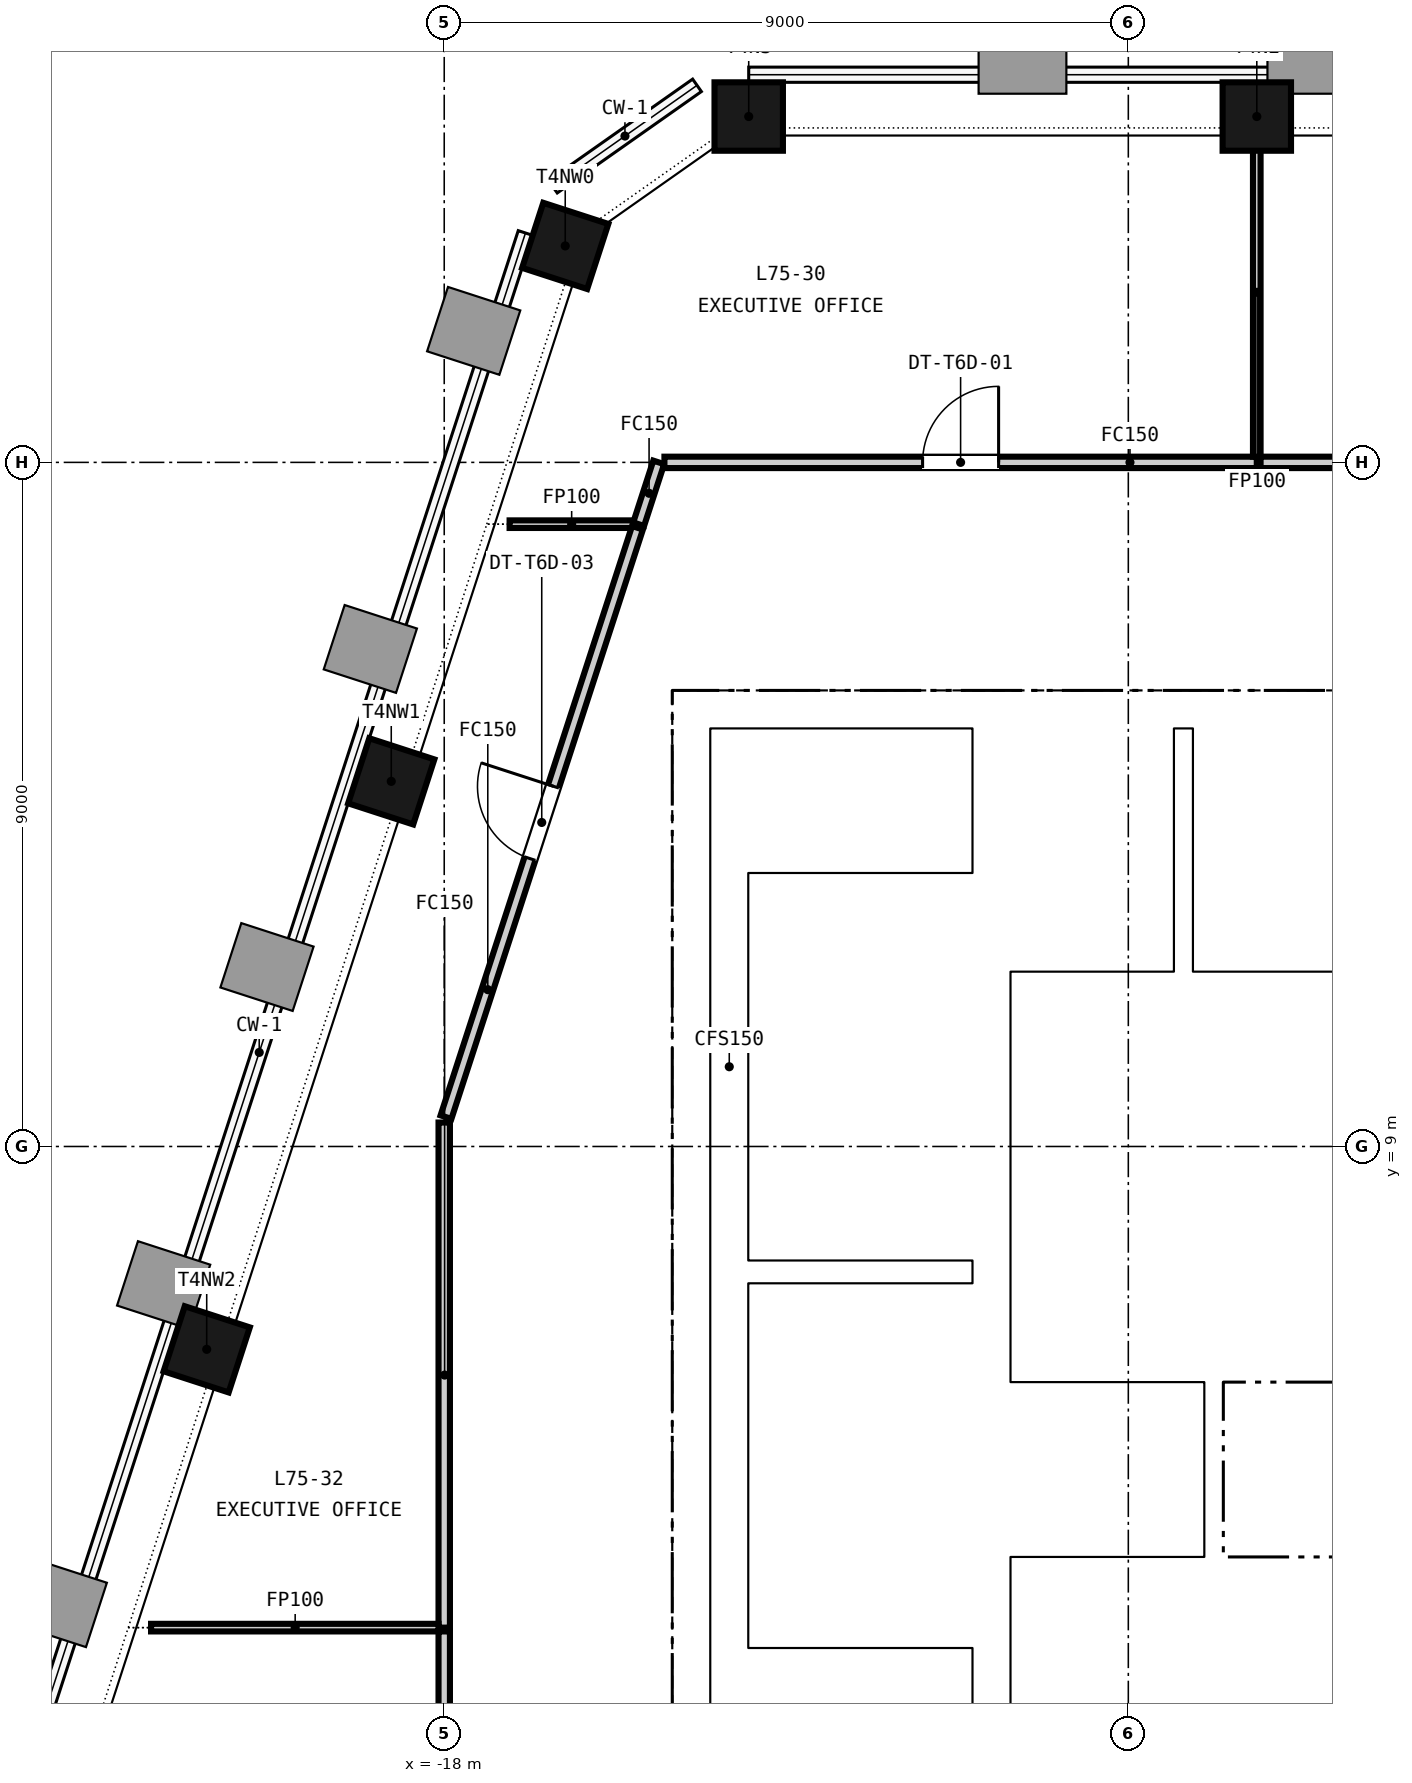
"""IFC4 building model, lengths in metres.
Left out: names, types, materials, properties, quantities, classifications, styles, units other than length and angle.
Written with IfcOpenShell. Run it as: python <this file> out.ifc"""

import sys

from ifc_helpers import new_model, si_unit, direction, frame, frame_2d, origin, origin_2d, place, context, subcontext, project, spatial, rectangle, extrude, element, fill, save


model = new_model("IFC4")
c1 = context("Model", 3, precision=1e-05, world=origin(), true_north=direction((0.0, 1.0)))
c2 = subcontext(c1, "Body", "Model", "MODEL_VIEW")
j1 = project(units=[si_unit("LENGTHUNIT", "METRE"), si_unit("PLANEANGLEUNIT", "RADIAN")], contexts=[c1])
p1 = place(None, origin())
s1 = spatial("IfcSite", under=j1, at=p1, CompositionType="ELEMENT")
p2 = place(p1, origin())
s2 = spatial("IfcBuilding", under=s1, at=p2, CompositionType="ELEMENT")
p3 = place(p2, frame((0.0, 0.0, 293.8)))
s3 = spatial("IfcBuildingStorey", under=s2, at=p3, CompositionType="ELEMENT", Elevation=293.8)
p4 = place(p3, frame((-15.0, 14.75, -0.15), z_axis=(0.0, 0.0, 1.0), x_axis=(1.0, 0.0, 0.0)))
e1 = element("IfcWall", 1, at=p4, inside=s3, PredefinedType="SOLIDWALL", context=c2, shape_type="SweptSolid", body=[
    extrude(rectangle(XDim=30.0, YDim=0.5, at=frame_2d((15.0, 0.0))), origin(), (0.0, 0.0, 1.0), 3.65),
])
p5 = place(p4, frame((9.25, 0.0, 0.15)))
e2 = element("IfcOpeningElement", 2, at=p5, cuts=e1, PredefinedType="OPENING", context=c2, shape_type="SweptSolid", body=[
    extrude(rectangle(XDim=1.5, YDim=2.1, at=frame_2d((0.75, 1.05))), frame((0.0, 0.26, 0.0), z_axis=(0.0, -1.0, 0.0), x_axis=(1.0, 0.0, 0.0)), (0.0, 0.0, 1.0), 0.52),
])
p6 = place(p4, frame((19.4, 0.0, 0.15)))
e3 = element("IfcOpeningElement", 3, at=p6, cuts=e1, PredefinedType="OPENING", context=c2, shape_type="SweptSolid", body=[
    extrude(rectangle(XDim=1.5, YDim=2.1, at=frame_2d((0.75, 1.05))), frame((0.0, 0.26, 0.0), z_axis=(0.0, -1.0, 0.0), x_axis=(1.0, 0.0, 0.0)), (0.0, 0.0, 1.0), 0.52),
])
p7 = place(p4, frame((1.5, 0.0, 0.15)))
e4 = element("IfcOpeningElement", 4, at=p7, cuts=e1, PredefinedType="OPENING", context=c2, shape_type="SweptSolid", body=[
    extrude(rectangle(XDim=1.2, YDim=2.1, at=frame_2d((0.6, 1.05))), frame((0.0, 0.26, 0.0), z_axis=(0.0, -1.0, 0.0), x_axis=(1.0, 0.0, 0.0)), (0.0, 0.0, 1.0), 0.52),
])
p8 = place(p4, frame((27.3, 0.0, 0.15)))
e5 = element("IfcOpeningElement", 5, at=p8, cuts=e1, PredefinedType="OPENING", context=c2, shape_type="SweptSolid", body=[
    extrude(rectangle(XDim=1.2, YDim=2.1, at=frame_2d((0.6, 1.05))), frame((0.0, 0.26, 0.0), z_axis=(0.0, -1.0, 0.0), x_axis=(1.0, 0.0, 0.0)), (0.0, 0.0, 1.0), 0.52),
])
for number, where, z_axis, x_axis in (
    (6, (-14.75, 0.5, -0.15), (0.0, 0.0, 1.0), (0.0, 1.0, 0.0)),
    (7, (-10.8, 0.5, -0.15), (0.0, 0.0, 1.0), (0.0, 1.0, 0.0)),
):
    element("IfcWall", number, at=place(p3, frame(where, z_axis=z_axis, x_axis=x_axis)), inside=s3, PredefinedType="SOLIDWALL", context=c2, shape_type="SweptSolid", body=[
        extrude(rectangle(XDim=14.0, YDim=0.5, at=frame_2d((7.0, 0.0))), origin(), (0.0, 0.0, 1.0), 3.65),
    ])
for number, where, z_axis, x_axis in (
    (8, (-7.31, 22.55, -0.15), (0.0, 0.0, 1.0), (-1.0, 0.0, 0.0)),
    (9, (-13.994, 22.55, -0.15), (0.0, 0.0, 1.0), (-1.0, 0.0, 0.0)),
    (10, (-16.408, 20.848, -0.15), (0.0, 0.0, 1.0), (-0.309, -0.951, 0.0)),
    (11, (-18.697, 13.804, -0.15), (0.0, 0.0, 1.0), (-0.309, -0.951, 0.0)),
    (12, (-21.125, 6.331, -0.15), (0.0, 0.0, 1.0), (-0.309, -0.951, 0.0)),
):
    element("IfcColumn", number, at=place(p3, frame(where, z_axis=z_axis, x_axis=x_axis)), inside=s3, PredefinedType="COLUMN", context=c2, shape_type="SweptSolid", body=[
        extrude(rectangle(XDim=0.9, YDim=0.9, at=origin_2d()), origin(), (0.0, 0.0, 1.0), 3.65),
    ])
p9 = place(p3, frame((-10.55, 3.5, 0.0), z_axis=(0.0, 0.0, 1.0), x_axis=(1.0, 0.0, 0.0)))
e13 = element("IfcWall", 13, at=p9, inside=s3, PredefinedType="PARTITIONING", context=c2, shape_type="SweptSolid", body=[
    extrude(rectangle(XDim=21.1, YDim=0.2, at=frame_2d((10.55, 0.0))), origin(), (0.0, 0.0, 1.0), 3.5),
])
p10 = place(p9, frame((0.675, 0.0, 0.0)))
e14 = element("IfcOpeningElement", 14, at=p10, cuts=e13, PredefinedType="OPENING", context=c2, shape_type="SweptSolid", body=[
    extrude(rectangle(XDim=1.2, YDim=2.1, at=frame_2d((0.6, 1.05))), frame((0.0, 0.11, 0.0), z_axis=(0.0, -1.0, 0.0), x_axis=(1.0, 0.0, 0.0)), (0.0, 0.0, 1.0), 0.22),
])
p11 = place(p9, frame((3.475, 0.0, 0.0)))
e15 = element("IfcOpeningElement", 15, at=p11, cuts=e13, PredefinedType="OPENING", context=c2, shape_type="SweptSolid", body=[
    extrude(rectangle(XDim=1.2, YDim=2.1, at=frame_2d((0.6, 1.05))), frame((0.0, 0.11, 0.0), z_axis=(0.0, -1.0, 0.0), x_axis=(1.0, 0.0, 0.0)), (0.0, 0.0, 1.0), 0.22),
])
p12 = place(p9, frame((6.275, 0.0, 0.0)))
e16 = element("IfcOpeningElement", 16, at=p12, cuts=e13, PredefinedType="OPENING", context=c2, shape_type="SweptSolid", body=[
    extrude(rectangle(XDim=1.2, YDim=2.1, at=frame_2d((0.6, 1.05))), frame((0.0, 0.11, 0.0), z_axis=(0.0, -1.0, 0.0), x_axis=(1.0, 0.0, 0.0)), (0.0, 0.0, 1.0), 0.22),
])
p13 = place(p9, frame((9.075, 0.0, 0.0)))
e17 = element("IfcOpeningElement", 17, at=p13, cuts=e13, PredefinedType="OPENING", context=c2, shape_type="SweptSolid", body=[
    extrude(rectangle(XDim=1.2, YDim=2.1, at=frame_2d((0.6, 1.05))), frame((0.0, 0.11, 0.0), z_axis=(0.0, -1.0, 0.0), x_axis=(1.0, 0.0, 0.0)), (0.0, 0.0, 1.0), 0.22),
])
p14 = place(p9, frame((11.875, 0.0, 0.0)))
e18 = element("IfcOpeningElement", 18, at=p14, cuts=e13, PredefinedType="OPENING", context=c2, shape_type="SweptSolid", body=[
    extrude(rectangle(XDim=1.2, YDim=2.1, at=frame_2d((0.6, 1.05))), frame((0.0, 0.11, 0.0), z_axis=(0.0, -1.0, 0.0), x_axis=(1.0, 0.0, 0.0)), (0.0, 0.0, 1.0), 0.22),
])
p15 = place(p9, frame((14.675, 0.0, 0.0)))
e19 = element("IfcOpeningElement", 19, at=p15, cuts=e13, PredefinedType="OPENING", context=c2, shape_type="SweptSolid", body=[
    extrude(rectangle(XDim=1.2, YDim=2.1, at=frame_2d((0.6, 1.05))), frame((0.0, 0.11, 0.0), z_axis=(0.0, -1.0, 0.0), x_axis=(1.0, 0.0, 0.0)), (0.0, 0.0, 1.0), 0.22),
])
p16 = place(p9, frame((17.475, 0.0, 0.0)))
e20 = element("IfcOpeningElement", 20, at=p16, cuts=e13, PredefinedType="OPENING", context=c2, shape_type="SweptSolid", body=[
    extrude(rectangle(XDim=1.2, YDim=2.1, at=frame_2d((0.6, 1.05))), frame((0.0, 0.11, 0.0), z_axis=(0.0, -1.0, 0.0), x_axis=(1.0, 0.0, 0.0)), (0.0, 0.0, 1.0), 0.22),
])
p17 = place(p9, frame((19.9, 0.0, 0.0)))
e21 = element("IfcOpeningElement", 21, at=p17, cuts=e13, PredefinedType="OPENING", context=c2, shape_type="SweptSolid", body=[
    extrude(rectangle(XDim=0.9, YDim=2.1, at=frame_2d((0.45, 1.05))), frame((0.0, 0.11, 0.0), z_axis=(0.0, -1.0, 0.0), x_axis=(1.0, 0.0, 0.0)), (0.0, 0.0, 1.0), 0.22),
])
p18 = place(p3, frame((-10.55, 6.025, 0.0), z_axis=(0.0, 0.0, 1.0), x_axis=(1.0, 0.0, 0.0)))
e22 = element("IfcWall", 22, at=p18, inside=s3, PredefinedType="PARTITIONING", context=c2, shape_type="SweptSolid", body=[
    extrude(rectangle(XDim=21.1, YDim=0.25, at=frame_2d((10.55, 0.0))), origin(), (0.0, 0.0, 1.0), 3.5),
])
p19 = place(p3, frame((-10.55, 11.2, 0.0), z_axis=(0.0, 0.0, 1.0), x_axis=(1.0, 0.0, 0.0)))
e23 = element("IfcWall", 23, at=p19, inside=s3, PredefinedType="PARTITIONING", context=c2, shape_type="SweptSolid", body=[
    extrude(rectangle(XDim=4.8, YDim=0.2, at=frame_2d((2.4, 0.0))), origin(), (0.0, 0.0, 1.0), 3.5),
])
p20 = place(p19, frame((0.525, 0.0, 0.0)))
e24 = element("IfcOpeningElement", 24, at=p20, cuts=e23, PredefinedType="OPENING", context=c2, shape_type="SweptSolid", body=[
    extrude(rectangle(XDim=1.1, YDim=2.1, at=frame_2d((0.55, 1.05))), frame((0.0, 0.11, 0.0), z_axis=(0.0, -1.0, 0.0), x_axis=(1.0, 0.0, 0.0)), (0.0, 0.0, 1.0), 0.22),
])
p21 = place(p19, frame((2.925, 0.0, 0.0)))
e25 = element("IfcOpeningElement", 25, at=p21, cuts=e23, PredefinedType="OPENING", context=c2, shape_type="SweptSolid", body=[
    extrude(rectangle(XDim=1.1, YDim=2.1, at=frame_2d((0.55, 1.05))), frame((0.0, 0.11, 0.0), z_axis=(0.0, -1.0, 0.0), x_axis=(1.0, 0.0, 0.0)), (0.0, 0.0, 1.0), 0.22),
])
p22 = place(p3, frame((-7.875, 3.6, 0.0), z_axis=(0.0, 0.0, 1.0), x_axis=(0.0, 1.0, 0.0)))
e26 = element("IfcWall", 26, at=p22, inside=s3, PredefinedType="PARTITIONING", context=c2, shape_type="SweptSolid", body=[
    extrude(rectangle(XDim=2.3, YDim=0.25, at=frame_2d((1.15, 0.0))), origin(), (0.0, 0.0, 1.0), 3.5),
])
p23 = place(p3, frame((-8.275, 11.3, 0.0), z_axis=(0.0, 0.0, 1.0), x_axis=(0.0, 1.0, 0.0)))
e27 = element("IfcWall", 27, at=p23, inside=s3, PredefinedType="PARTITIONING", context=c2, shape_type="SweptSolid", body=[
    extrude(rectangle(XDim=3.2, YDim=0.25, at=frame_2d((1.6, 0.0))), origin(), (0.0, 0.0, 1.0), 3.5),
])
p24 = place(p3, frame((-14.0, 7.35, 0.0), z_axis=(0.0, 0.0, 1.0), x_axis=(1.0, 0.0, 0.0)))
e28 = element("IfcWall", 28, at=p24, inside=s3, PredefinedType="SOLIDWALL", context=c2, shape_type="SweptSolid", body=[
    extrude(rectangle(XDim=2.95, YDim=0.3, at=frame_2d((1.475, 0.0))), origin(), (0.0, 0.0, 1.0), 3.5),
])
p25 = place(p3, frame((-14.25, 0.5, 0.0), z_axis=(0.0, 0.0, 1.0), x_axis=(0.0, 1.0, 0.0)))
e29 = element("IfcWall", 29, at=p25, inside=s3, PredefinedType="SOLIDWALL", context=c2, shape_type="SweptSolid", body=[
    extrude(rectangle(XDim=14.0, YDim=0.5, at=frame_2d((7.0, 0.0))), origin(), (0.0, 0.0, 1.0), 3.5),
])
p26 = place(p3, frame((-15.442, 17.187, 0.0), z_axis=(0.0, 0.0, 1.0), x_axis=(0.308763129345, 0.951138964588, 0.0)))
e30 = element("IfcWall", 30, at=p26, inside=s3, PredefinedType="PARTITIONING", context=c2, shape_type="SweptSolid", body=[
    extrude(rectangle(XDim=0.855, YDim=0.15, at=frame_2d((0.427, 0.0))), origin(), (0.0, 0.0, 1.0), 2.751),
])
p27 = place(p3, frame((-15.103, 18.0, 0.0), z_axis=(0.0, 0.0, 1.0), x_axis=(1.0, 0.0, 0.0)))
e31 = element("IfcWall", 31, at=p27, inside=s3, PredefinedType="PARTITIONING", context=c2, shape_type="SweptSolid", body=[
    extrude(rectangle(XDim=7.793, YDim=0.15, at=frame_2d((3.896, 0.0))), origin(), (0.0, 0.0, 1.0), 2.751),
])
p28 = place(p27, frame((3.396, 0.0, 0.0)))
e32 = element("IfcOpeningElement", 32, at=p28, cuts=e31, PredefinedType="OPENING", context=c2, shape_type="SweptSolid", body=[
    extrude(rectangle(XDim=1.0, YDim=2.1, at=frame_2d((0.5, 1.05))), frame((0.0, 0.085, 0.0), z_axis=(0.0, -1.0, 0.0), x_axis=(1.0, 0.0, 0.0)), (0.0, 0.0, 1.0), 0.17),
])
p29 = place(p3, frame((-7.31, 18.075, 0.0), z_axis=(0.0, 0.0, 1.0), x_axis=(0.0, 1.0, 0.0)))
e33 = element("IfcWall", 33, at=p29, inside=s3, PredefinedType="PARTITIONING", context=c2, shape_type="SweptSolid", body=[
    extrude(rectangle(XDim=4.325, YDim=0.1, at=frame_2d((2.163, 0.0))), origin(), (0.0, 0.0, 1.0), 2.751),
])
p30 = place(p3, frame((-17.14, 17.187, 0.0), z_axis=(0.0, 0.0, 1.0), x_axis=(1.0, 0.0, 0.0)))
e34 = element("IfcWall", 34, at=p30, inside=s3, PredefinedType="PARTITIONING", context=c2, shape_type="SweptSolid", body=[
    extrude(rectangle(XDim=1.623, YDim=0.1, at=frame_2d((0.812, 0.0))), origin(), (0.0, 0.0, 1.0), 2.751),
])
p31 = place(p3, frame((-7.26, 18.0, 0.0), z_axis=(0.0, 0.0, 1.0), x_axis=(1.0, 0.0, 0.0)))
e35 = element("IfcWall", 35, at=p31, inside=s3, PredefinedType="PARTITIONING", context=c2, shape_type="SweptSolid", body=[
    extrude(rectangle(XDim=17.962, YDim=0.15, at=frame_2d((8.981, 0.0))), origin(), (0.0, 0.0, 1.0), 2.751),
])
p32 = place(p31, frame((8.481, 0.0, 0.0)))
e36 = element("IfcOpeningElement", 36, at=p32, cuts=e35, PredefinedType="OPENING", context=c2, shape_type="SweptSolid", body=[
    extrude(rectangle(XDim=1.0, YDim=2.1, at=frame_2d((0.5, 1.05))), frame((0.0, 0.085, 0.0), z_axis=(0.0, -1.0, 0.0), x_axis=(1.0, 0.0, 0.0)), (0.0, 0.0, 1.0), 0.17),
])
p33 = place(p3, frame((-18.0, 2.67, 0.0), z_axis=(0.0, 0.0, 1.0), x_axis=(0.0, 1.0, 0.0)))
e37 = element("IfcWall", 37, at=p33, inside=s3, PredefinedType="PARTITIONING", context=c2, shape_type="SweptSolid", body=[
    extrude(rectangle(XDim=6.645, YDim=0.15, at=frame_2d((3.323, 0.0))), origin(), (0.0, 0.0, 1.0), 2.751),
])
p34 = place(p3, frame((-17.977, 9.386, 0.0), z_axis=(0.0, 0.0, 1.0), x_axis=(0.309031221155, 0.951051893616, 0.0)))
e38 = element("IfcWall", 38, at=p34, inside=s3, PredefinedType="PARTITIONING", context=c2, shape_type="SweptSolid", body=[
    extrude(rectangle(XDim=8.152, YDim=0.15, at=frame_2d((4.076, 0.0))), origin(), (0.0, 0.0, 1.0), 2.751),
])
p35 = place(p34, frame((3.576, 0.0, 0.0)))
e39 = element("IfcOpeningElement", 39, at=p35, cuts=e38, PredefinedType="OPENING", context=c2, shape_type="SweptSolid", body=[
    extrude(rectangle(XDim=1.0, YDim=2.1, at=frame_2d((0.5, 1.05))), frame((0.0, 0.085, 0.0), z_axis=(0.0, -1.0, 0.0), x_axis=(1.0, 0.0, 0.0)), (0.0, 0.0, 1.0), 0.17),
])
p36 = place(p3, frame((-21.857, 2.67, 0.0), z_axis=(0.0, 0.0, 1.0), x_axis=(1.0, 0.0, 0.0)))
e40 = element("IfcWall", 40, at=p36, inside=s3, PredefinedType="PARTITIONING", context=c2, shape_type="SweptSolid", body=[
    extrude(rectangle(XDim=3.782, YDim=0.1, at=frame_2d((1.891, 0.0))), origin(), (0.0, 0.0, 1.0), 2.751),
])
p37 = place(p3, frame((-18.0, -4.325, 0.0), z_axis=(0.0, 0.0, 1.0), x_axis=(0.0, 1.0, 0.0)))
e41 = element("IfcWall", 41, at=p37, inside=s3, PredefinedType="PARTITIONING", context=c2, shape_type="SweptSolid", body=[
    extrude(rectangle(XDim=6.945, YDim=0.15, at=frame_2d((3.473, 0.0))), origin(), (0.0, 0.0, 1.0), 2.751),
])
p38 = place(p37, frame((2.972, 0.0, 0.0)))
e42 = element("IfcOpeningElement", 42, at=p38, cuts=e41, PredefinedType="OPENING", context=c2, shape_type="SweptSolid", body=[
    extrude(rectangle(XDim=1.0, YDim=2.1, at=frame_2d((0.5, 1.05))), frame((0.0, 0.085, 0.0), z_axis=(0.0, -1.0, 0.0), x_axis=(1.0, 0.0, 0.0)), (0.0, 0.0, 1.0), 0.17),
])
p39 = place(p10, origin())
e43 = element("IfcDoor", 43, at=p39, inside=s3, OperationType="DOUBLE_DOOR_SLIDING", PredefinedType="DOOR", context=c2, shape_type="SweptSolid", body=[
    extrude(rectangle(XDim=1.2, YDim=2.1, at=frame_2d((0.6, 1.05))), frame((0.0, 0.025, 0.0), z_axis=(0.0, -1.0, 0.0), x_axis=(1.0, 0.0, 0.0)), (0.0, 0.0, 1.0), 0.05),
])
fill(e14, e43)
p40 = place(p11, origin())
e44 = element("IfcDoor", 44, at=p40, inside=s3, OperationType="DOUBLE_DOOR_SLIDING", PredefinedType="DOOR", context=c2, shape_type="SweptSolid", body=[
    extrude(rectangle(XDim=1.2, YDim=2.1, at=frame_2d((0.6, 1.05))), frame((0.0, 0.025, 0.0), z_axis=(0.0, -1.0, 0.0), x_axis=(1.0, 0.0, 0.0)), (0.0, 0.0, 1.0), 0.05),
])
fill(e15, e44)
p41 = place(p20, origin())
e45 = element("IfcDoor", 45, at=p41, inside=s3, OperationType="DOUBLE_DOOR_SLIDING", PredefinedType="DOOR", context=c2, shape_type="SweptSolid", body=[
    extrude(rectangle(XDim=1.1, YDim=2.1, at=frame_2d((0.55, 1.05))), frame((0.0, 0.025, 0.0), z_axis=(0.0, -1.0, 0.0), x_axis=(1.0, 0.0, 0.0)), (0.0, 0.0, 1.0), 0.05),
])
fill(e24, e45)
p42 = place(p21, origin())
e46 = element("IfcDoor", 46, at=p42, inside=s3, OperationType="DOUBLE_DOOR_SLIDING", PredefinedType="DOOR", context=c2, shape_type="SweptSolid", body=[
    extrude(rectangle(XDim=1.1, YDim=2.1, at=frame_2d((0.55, 1.05))), frame((0.0, 0.025, 0.0), z_axis=(0.0, -1.0, 0.0), x_axis=(1.0, 0.0, 0.0)), (0.0, 0.0, 1.0), 0.05),
])
fill(e25, e46)
p43 = place(p7, origin())
e47 = element("IfcDoor", 47, at=p43, inside=s3, OperationType="SINGLE_SWING_RIGHT", PredefinedType="DOOR", context=c2, shape_type="SweptSolid", body=[
    extrude(rectangle(XDim=1.2, YDim=2.1, at=frame_2d((0.6, 1.05))), frame((0.0, 0.025, 0.0), z_axis=(0.0, -1.0, 0.0), x_axis=(1.0, 0.0, 0.0)), (0.0, 0.0, 1.0), 0.05),
])
fill(e4, e47)
p44 = place(p28, origin())
e48 = element("IfcDoor", 48, at=p44, inside=s3, OperationType="SINGLE_SWING_RIGHT", PredefinedType="DOOR", context=c2, shape_type="SweptSolid", body=[
    extrude(rectangle(XDim=1.0, YDim=2.1, at=frame_2d((0.5, 1.05))), frame((0.0, 0.025, 0.0), z_axis=(0.0, -1.0, 0.0), x_axis=(1.0, 0.0, 0.0)), (0.0, 0.0, 1.0), 0.05),
])
fill(e32, e48)
p45 = place(p35, origin())
e49 = element("IfcDoor", 49, at=p45, inside=s3, OperationType="SINGLE_SWING_RIGHT", PredefinedType="DOOR", context=c2, shape_type="SweptSolid", body=[
    extrude(rectangle(XDim=1.0, YDim=2.1, at=frame_2d((0.5, 1.05))), frame((0.0, 0.025, 0.0), z_axis=(0.0, -1.0, 0.0), x_axis=(1.0, 0.0, 0.0)), (0.0, 0.0, 1.0), 0.05),
])
fill(e39, e49)
save(model, sys.argv[1])
